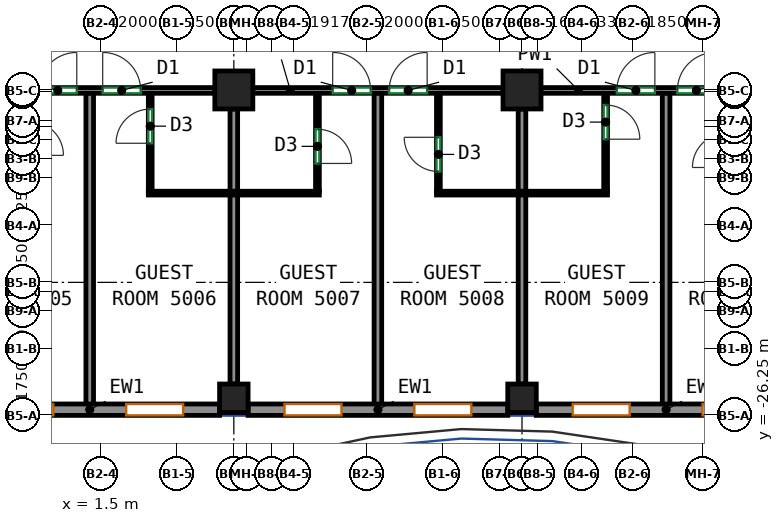
"""IFC4 building model, lengths in metres.
Left out: names, types, materials, properties, quantities, classifications, styles, units other than length and angle.
Written with IfcOpenShell. Run it as: python <this file> out.ifc"""

import sys

from ifc_helpers import new_model, si_unit, direction, frame, frame_2d, origin, origin_2d, place, context, subcontext, project, spatial, rectangle, extrude, source, transform, mapped, element, fill, save


model = new_model("IFC4")
c1 = context("Model", 3, precision=1e-05, world=origin(), true_north=direction((0.0, 1.0)))
c2 = subcontext(c1, "Body", "Model", "MODEL_VIEW")
j1 = project(units=[si_unit("LENGTHUNIT", "METRE"), si_unit("PLANEANGLEUNIT", "RADIAN")], contexts=[c1])
p1 = place(None, origin())
s1 = spatial("IfcSite", under=j1, at=p1, CompositionType="ELEMENT")
p2 = place(p1, origin())
s2 = spatial("IfcBuilding", under=s1, at=p2, CompositionType="ELEMENT")
p3 = place(p2, frame((0.0, 0.0, 206.7)))
s3 = spatial("IfcBuildingStorey", under=s2, at=p3, CompositionType="ELEMENT", Elevation=206.7)
m1 = source(origin(), c2, "Body", "SweptSolid", [
    extrude(rectangle(XDim=0.75, YDim=0.75, at=origin_2d()), origin(), (0.0, 0.0, 1.0), 3.12),
])
p4 = place(p3, frame((5.0, -25.8, 0.0), z_axis=(0.0, 0.0, 1.0), x_axis=(1.0, 0.0, 0.0)))
e1 = element("IfcColumn", 1, at=p4, inside=s3, PredefinedType="COLUMN", context=c2, shape_type="MappedRepresentation", body=[
    mapped(m1, transform((0.0, 0.0, 0.0))),
])
m2 = source(origin(), c2, "Body", "SweptSolid", [
    extrude(rectangle(XDim=1.0, YDim=1.0, at=origin_2d()), origin(), (0.0, 0.0, 1.0), 3.12),
])
p5 = place(p3, frame((5.0, -17.688, 0.0), z_axis=(0.0, 0.0, 1.0), x_axis=(1.0, 0.0, 0.0)))
e2 = element("IfcColumn", 2, at=p5, inside=s3, PredefinedType="COLUMN", context=c2, shape_type="MappedRepresentation", body=[
    mapped(m2, transform((0.0, 0.0, 0.0))),
])
p6 = place(p3, frame((12.583, -25.8, 0.0), z_axis=(0.0, 0.0, 1.0), x_axis=(1.0, 0.0, 0.0)))
e3 = element("IfcColumn", 3, at=p6, inside=s3, PredefinedType="COLUMN", context=c2, shape_type="MappedRepresentation", body=[
    mapped(m1, transform((0.0, 0.0, 0.0))),
])
p7 = place(p3, frame((12.583, -17.688, 0.0), z_axis=(0.0, 0.0, 1.0), x_axis=(1.0, 0.0, 0.0)))
e4 = element("IfcColumn", 4, at=p7, inside=s3, PredefinedType="COLUMN", context=c2, shape_type="MappedRepresentation", body=[
    mapped(m2, transform((0.0, 0.0, 0.0))),
])
m3 = source(origin(), c2, "Body", "SweptSolid", [
    extrude(rectangle(XDim=6.833, YDim=0.3, at=frame_2d((3.417, 0.0))), origin(), (0.0, 0.0, 1.0), 3.12),
])
p8 = place(p3, frame((-2.208, -26.1, 0.0), z_axis=(0.0, 0.0, 1.0), x_axis=(1.0, 0.0, 0.0)))
e5 = element("IfcWall", 5, at=p8, inside=s3, PredefinedType="SOLIDWALL", context=c2, shape_type="MappedRepresentation", body=[
    mapped(m3, transform((0.0, 0.0, 0.0))),
])
p9 = place(p8, frame((0.958, 0.0, 0.85)))
e6 = element("IfcOpeningElement", 6, at=p9, cuts=e5, PredefinedType="OPENING", context=c2, shape_type="SweptSolid", body=[
    extrude(rectangle(XDim=1.5, YDim=1.95, at=frame_2d((0.75, 0.975))), frame((0.0, 0.16, 0.0), z_axis=(0.0, -1.0, 0.0), x_axis=(1.0, 0.0, 0.0)), (0.0, 0.0, 1.0), 0.32),
])
p10 = place(p8, frame((4.375, 0.0, 0.85)))
e7 = element("IfcOpeningElement", 7, at=p10, cuts=e5, PredefinedType="OPENING", context=c2, shape_type="SweptSolid", body=[
    extrude(rectangle(XDim=1.5, YDim=1.95, at=frame_2d((0.75, 0.975))), frame((0.0, 0.16, 0.0), z_axis=(0.0, -1.0, 0.0), x_axis=(1.0, 0.0, 0.0)), (0.0, 0.0, 1.0), 0.32),
])
p11 = place(p3, frame((5.375, -26.1, 0.0), z_axis=(0.0, 0.0, 1.0), x_axis=(1.0, 0.0, 0.0)))
e8 = element("IfcWall", 8, at=p11, inside=s3, PredefinedType="SOLIDWALL", context=c2, shape_type="MappedRepresentation", body=[
    mapped(m3, transform((0.0, 0.0, 0.0))),
])
p12 = place(p11, frame((0.958, 0.0, 0.85)))
e9 = element("IfcOpeningElement", 9, at=p12, cuts=e8, PredefinedType="OPENING", context=c2, shape_type="SweptSolid", body=[
    extrude(rectangle(XDim=1.5, YDim=1.95, at=frame_2d((0.75, 0.975))), frame((0.0, 0.16, 0.0), z_axis=(0.0, -1.0, 0.0), x_axis=(1.0, 0.0, 0.0)), (0.0, 0.0, 1.0), 0.32),
])
p13 = place(p11, frame((4.375, 0.0, 0.85)))
e10 = element("IfcOpeningElement", 10, at=p13, cuts=e8, PredefinedType="OPENING", context=c2, shape_type="SweptSolid", body=[
    extrude(rectangle(XDim=1.5, YDim=1.95, at=frame_2d((0.75, 0.975))), frame((0.0, 0.16, 0.0), z_axis=(0.0, -1.0, 0.0), x_axis=(1.0, 0.0, 0.0)), (0.0, 0.0, 1.0), 0.32),
])
m4 = source(origin(), c2, "Body", "SweptSolid", [
    extrude(rectangle(XDim=6.833, YDim=0.3, at=frame_2d((3.417, 0.0))), origin(), (0.0, 0.0, 1.0), 3.12),
])
p14 = place(p3, frame((12.958, -26.1, 0.0), z_axis=(0.0, 0.0, 1.0), x_axis=(1.0, 0.0, 0.0)))
e11 = element("IfcWall", 11, at=p14, inside=s3, PredefinedType="SOLIDWALL", context=c2, shape_type="MappedRepresentation", body=[
    mapped(m4, transform((0.0, 0.0, 0.0))),
])
p15 = place(p14, frame((0.958, 0.0, 0.85)))
e12 = element("IfcOpeningElement", 12, at=p15, cuts=e11, PredefinedType="OPENING", context=c2, shape_type="SweptSolid", body=[
    extrude(rectangle(XDim=1.5, YDim=1.95, at=frame_2d((0.75, 0.975))), frame((0.0, 0.16, 0.0), z_axis=(0.0, -1.0, 0.0), x_axis=(1.0, 0.0, 0.0)), (0.0, 0.0, 1.0), 0.32),
])
p16 = place(p14, frame((4.375, 0.0, 0.85)))
e13 = element("IfcOpeningElement", 13, at=p16, cuts=e11, PredefinedType="OPENING", context=c2, shape_type="SweptSolid", body=[
    extrude(rectangle(XDim=1.5, YDim=1.95, at=frame_2d((0.75, 0.975))), frame((0.0, 0.16, 0.0), z_axis=(0.0, -1.0, 0.0), x_axis=(1.0, 0.0, 0.0)), (0.0, 0.0, 1.0), 0.32),
])
p17 = place(p3, frame((-2.083, -17.7, 0.0), z_axis=(0.0, 0.0, 1.0), x_axis=(1.0, 0.0, 0.0)))
e14 = element("IfcWall", 14, at=p17, inside=s3, PredefinedType="PARTITIONING", context=c2, shape_type="SweptSolid", body=[
    extrude(rectangle(XDim=6.583, YDim=0.15, at=frame_2d((3.292, 0.0))), origin(), (0.0, 0.0, 1.0), 3.12),
])
p18 = place(p17, frame((1.95, 0.0, 0.0)))
e15 = element("IfcOpeningElement", 15, at=p18, cuts=e14, PredefinedType="OPENING", context=c2, shape_type="SweptSolid", body=[
    extrude(rectangle(XDim=1.0, YDim=2.1, at=frame_2d((0.5, 1.05))), frame((0.0, 0.085, 0.0), z_axis=(0.0, -1.0, 0.0), x_axis=(1.0, 0.0, 0.0)), (0.0, 0.0, 1.0), 0.17),
])
p19 = place(p17, frame((3.632, 0.0, 0.0)))
e16 = element("IfcOpeningElement", 16, at=p19, cuts=e14, PredefinedType="OPENING", context=c2, shape_type="SweptSolid", body=[
    extrude(rectangle(XDim=1.0, YDim=2.1, at=frame_2d((0.5, 1.05))), frame((0.0, 0.085, 0.0), z_axis=(0.0, -1.0, 0.0), x_axis=(1.0, 0.0, 0.0)), (0.0, 0.0, 1.0), 0.17),
])
p20 = place(p3, frame((5.5, -17.7, 0.0), z_axis=(0.0, 0.0, 1.0), x_axis=(1.0, 0.0, 0.0)))
e17 = element("IfcWall", 17, at=p20, inside=s3, PredefinedType="PARTITIONING", context=c2, shape_type="SweptSolid", body=[
    extrude(rectangle(XDim=6.583, YDim=0.15, at=frame_2d((3.292, 0.0))), origin(), (0.0, 0.0, 1.0), 3.12),
])
p21 = place(p20, frame((2.101, 0.0, 0.0)))
e18 = element("IfcOpeningElement", 18, at=p21, cuts=e17, PredefinedType="OPENING", context=c2, shape_type="SweptSolid", body=[
    extrude(rectangle(XDim=1.0, YDim=2.1, at=frame_2d((0.5, 1.05))), frame((0.0, 0.085, 0.0), z_axis=(0.0, -1.0, 0.0), x_axis=(1.0, 0.0, 0.0)), (0.0, 0.0, 1.0), 0.17),
])
p22 = place(p20, frame((3.587, 0.0, 0.0)))
e19 = element("IfcOpeningElement", 19, at=p22, cuts=e17, PredefinedType="OPENING", context=c2, shape_type="SweptSolid", body=[
    extrude(rectangle(XDim=1.0, YDim=2.1, at=frame_2d((0.5, 1.05))), frame((0.0, 0.085, 0.0), z_axis=(0.0, -1.0, 0.0), x_axis=(1.0, 0.0, 0.0)), (0.0, 0.0, 1.0), 0.17),
])
p23 = place(p3, frame((13.083, -17.7, 0.0), z_axis=(0.0, 0.0, 1.0), x_axis=(1.0, 0.0, 0.0)))
e20 = element("IfcWall", 20, at=p23, inside=s3, PredefinedType="PARTITIONING", context=c2, shape_type="SweptSolid", body=[
    extrude(rectangle(XDim=6.584, YDim=0.15, at=frame_2d((3.292, 0.0))), origin(), (0.0, 0.0, 1.0), 3.12),
])
p24 = place(p23, frame((1.996, 0.0, 0.0)))
e21 = element("IfcOpeningElement", 21, at=p24, cuts=e20, PredefinedType="OPENING", context=c2, shape_type="SweptSolid", body=[
    extrude(rectangle(XDim=1.0, YDim=2.1, at=frame_2d((0.5, 1.05))), frame((0.0, 0.085, 0.0), z_axis=(0.0, -1.0, 0.0), x_axis=(1.0, 0.0, 0.0)), (0.0, 0.0, 1.0), 0.17),
])
p25 = place(p23, frame((3.588, 0.0, 0.0)))
e22 = element("IfcOpeningElement", 22, at=p25, cuts=e20, PredefinedType="OPENING", context=c2, shape_type="SweptSolid", body=[
    extrude(rectangle(XDim=1.0, YDim=2.1, at=frame_2d((0.5, 1.05))), frame((0.0, 0.085, 0.0), z_axis=(0.0, -1.0, 0.0), x_axis=(1.0, 0.0, 0.0)), (0.0, 0.0, 1.0), 0.17),
])
p26 = place(p3, frame((1.208, -26.0, 0.0), z_axis=(0.0, 0.0, 1.0), x_axis=(0.0, 1.0, 0.0)))
e23 = element("IfcWall", 23, at=p26, inside=s3, PredefinedType="PARTITIONING", context=c2, shape_type="SweptSolid", body=[
    extrude(rectangle(XDim=8.223, YDim=0.2, at=frame_2d((4.111, 0.0))), origin(), (0.0, 0.0, 1.0), 3.12),
])
p27 = place(p3, frame((2.8, -20.352, 0.0), z_axis=(0.0, 0.0, 1.0), x_axis=(0.0, 1.0, 0.0)))
e24 = element("IfcWall", 24, at=p27, inside=s3, PredefinedType="PARTITIONING", context=c2, shape_type="SweptSolid", body=[
    extrude(rectangle(XDim=2.575, YDim=0.1, at=frame_2d((1.288, 0.0))), origin(), (0.0, 0.0, 1.0), 3.12),
])
p28 = place(p27, frame((1.262, 0.0, 0.0)))
e25 = element("IfcOpeningElement", 25, at=p28, cuts=e24, PredefinedType="OPENING", context=c2, shape_type="SweptSolid", body=[
    extrude(rectangle(XDim=0.9, YDim=2.1, at=frame_2d((0.45, 1.05))), frame((0.0, 0.06, 0.0), z_axis=(0.0, -1.0, 0.0), x_axis=(1.0, 0.0, 0.0)), (0.0, 0.0, 1.0), 0.12),
])
p29 = place(p3, frame((2.75, -20.402, 0.0), z_axis=(0.0, 0.0, 1.0), x_axis=(1.0, 0.0, 0.0)))
e26 = element("IfcWall", 26, at=p29, inside=s3, PredefinedType="PARTITIONING", context=c2, shape_type="SweptSolid", body=[
    extrude(rectangle(XDim=4.5, YDim=0.1, at=frame_2d((2.25, 0.0))), origin(), (0.0, 0.0, 1.0), 3.12),
])
p30 = place(p3, frame((5.0, -25.425, 0.0), z_axis=(0.0, 0.0, 1.0), x_axis=(0.0, 1.0, 0.0)))
e27 = element("IfcWall", 27, at=p30, inside=s3, PredefinedType="PARTITIONING", context=c2, shape_type="SweptSolid", body=[
    extrude(rectangle(XDim=4.973, YDim=0.2, at=frame_2d((2.487, 0.0))), origin(), (0.0, 0.0, 1.0), 3.12),
])
p31 = place(p3, frame((5.0, -20.352, 0.0), z_axis=(0.0, 0.0, 1.0), x_axis=(0.0, 1.0, 0.0)))
e28 = element("IfcWall", 28, at=p31, inside=s3, PredefinedType="PARTITIONING", context=c2, shape_type="SweptSolid", body=[
    extrude(rectangle(XDim=2.164, YDim=0.2, at=frame_2d((1.082, 0.0))), origin(), (0.0, 0.0, 1.0), 3.12),
])
p32 = place(p3, frame((7.2, -17.777, 0.0), z_axis=(0.0, 0.0, 1.0), x_axis=(0.0, -1.0, 0.0)))
e29 = element("IfcWall", 29, at=p32, inside=s3, PredefinedType="PARTITIONING", context=c2, shape_type="SweptSolid", body=[
    extrude(rectangle(XDim=2.575, YDim=0.1, at=frame_2d((1.288, 0.0))), origin(), (0.0, 0.0, 1.0), 3.12),
])
p33 = place(p32, frame((0.944, 0.0, 0.0)))
e30 = element("IfcOpeningElement", 30, at=p33, cuts=e29, PredefinedType="OPENING", context=c2, shape_type="SweptSolid", body=[
    extrude(rectangle(XDim=0.9, YDim=2.1, at=frame_2d((0.45, 1.05))), frame((0.0, 0.06, 0.0), z_axis=(0.0, -1.0, 0.0), x_axis=(1.0, 0.0, 0.0)), (0.0, 0.0, 1.0), 0.12),
])
p34 = place(p3, frame((8.791, -26.0, 0.0), z_axis=(0.0, 0.0, 1.0), x_axis=(0.0, 1.0, 0.0)))
e31 = element("IfcWall", 31, at=p34, inside=s3, PredefinedType="PARTITIONING", context=c2, shape_type="SweptSolid", body=[
    extrude(rectangle(XDim=8.223, YDim=0.2, at=frame_2d((4.111, 0.0))), origin(), (0.0, 0.0, 1.0), 3.12),
])
p35 = place(p3, frame((10.383, -20.352, 0.0), z_axis=(0.0, 0.0, 1.0), x_axis=(0.0, 1.0, 0.0)))
e32 = element("IfcWall", 32, at=p35, inside=s3, PredefinedType="PARTITIONING", context=c2, shape_type="SweptSolid", body=[
    extrude(rectangle(XDim=2.575, YDim=0.1, at=frame_2d((1.288, 0.0))), origin(), (0.0, 0.0, 1.0), 3.12),
])
p36 = place(p35, frame((0.519, 0.0, 0.0)))
e33 = element("IfcOpeningElement", 33, at=p36, cuts=e32, PredefinedType="OPENING", context=c2, shape_type="SweptSolid", body=[
    extrude(rectangle(XDim=0.9, YDim=2.1, at=frame_2d((0.45, 1.05))), frame((0.0, 0.06, 0.0), z_axis=(0.0, -1.0, 0.0), x_axis=(1.0, 0.0, 0.0)), (0.0, 0.0, 1.0), 0.12),
])
p37 = place(p3, frame((10.333, -20.402, 0.0), z_axis=(0.0, 0.0, 1.0), x_axis=(1.0, 0.0, 0.0)))
e34 = element("IfcWall", 34, at=p37, inside=s3, PredefinedType="PARTITIONING", context=c2, shape_type="SweptSolid", body=[
    extrude(rectangle(XDim=4.5, YDim=0.1, at=frame_2d((2.25, 0.0))), origin(), (0.0, 0.0, 1.0), 3.12),
])
p38 = place(p3, frame((12.583, -25.425, 0.0), z_axis=(0.0, 0.0, 1.0), x_axis=(0.0, 1.0, 0.0)))
e35 = element("IfcWall", 35, at=p38, inside=s3, PredefinedType="PARTITIONING", context=c2, shape_type="SweptSolid", body=[
    extrude(rectangle(XDim=4.973, YDim=0.2, at=frame_2d((2.487, 0.0))), origin(), (0.0, 0.0, 1.0), 3.12),
])
p39 = place(p3, frame((12.583, -20.352, 0.0), z_axis=(0.0, 0.0, 1.0), x_axis=(0.0, 1.0, 0.0)))
e36 = element("IfcWall", 36, at=p39, inside=s3, PredefinedType="PARTITIONING", context=c2, shape_type="SweptSolid", body=[
    extrude(rectangle(XDim=2.164, YDim=0.2, at=frame_2d((1.082, 0.0))), origin(), (0.0, 0.0, 1.0), 3.12),
])
p40 = place(p3, frame((14.783, -17.777, 0.0), z_axis=(0.0, 0.0, 1.0), x_axis=(0.0, -1.0, 0.0)))
e37 = element("IfcWall", 37, at=p40, inside=s3, PredefinedType="PARTITIONING", context=c2, shape_type="SweptSolid", body=[
    extrude(rectangle(XDim=2.575, YDim=0.1, at=frame_2d((1.288, 0.0))), origin(), (0.0, 0.0, 1.0), 3.12),
])
p41 = place(p40, frame((0.306, 0.0, 0.0)))
e38 = element("IfcOpeningElement", 38, at=p41, cuts=e37, PredefinedType="OPENING", context=c2, shape_type="SweptSolid", body=[
    extrude(rectangle(XDim=0.9, YDim=2.1, at=frame_2d((0.45, 1.05))), frame((0.0, 0.06, 0.0), z_axis=(0.0, -1.0, 0.0), x_axis=(1.0, 0.0, 0.0)), (0.0, 0.0, 1.0), 0.12),
])
p42 = place(p3, frame((16.375, -26.0, 0.0), z_axis=(0.0, 0.0, 1.0), x_axis=(0.0, 1.0, 0.0)))
e39 = element("IfcWall", 39, at=p42, inside=s3, PredefinedType="PARTITIONING", context=c2, shape_type="SweptSolid", body=[
    extrude(rectangle(XDim=8.223, YDim=0.2, at=frame_2d((4.111, 0.0))), origin(), (0.0, 0.0, 1.0), 3.12),
])
p43 = place(p9, origin())
e40 = element("IfcWindow", 40, at=p43, inside=s3, PartitioningType="SINGLE_PANEL", PredefinedType="WINDOW", context=c2, shape_type="SweptSolid", body=[
    extrude(rectangle(XDim=1.5, YDim=1.95, at=frame_2d((0.75, 0.975))), frame((0.0, 0.03, 0.0), z_axis=(0.0, -1.0, 0.0), x_axis=(1.0, 0.0, 0.0)), (0.0, 0.0, 1.0), 0.06),
])
fill(e6, e40)
p44 = place(p10, origin())
e41 = element("IfcWindow", 41, at=p44, inside=s3, PartitioningType="SINGLE_PANEL", PredefinedType="WINDOW", context=c2, shape_type="SweptSolid", body=[
    extrude(rectangle(XDim=1.5, YDim=1.95, at=frame_2d((0.75, 0.975))), frame((0.0, 0.03, 0.0), z_axis=(0.0, -1.0, 0.0), x_axis=(1.0, 0.0, 0.0)), (0.0, 0.0, 1.0), 0.06),
])
fill(e7, e41)
p45 = place(p12, origin())
e42 = element("IfcWindow", 42, at=p45, inside=s3, PartitioningType="SINGLE_PANEL", PredefinedType="WINDOW", context=c2, shape_type="SweptSolid", body=[
    extrude(rectangle(XDim=1.5, YDim=1.95, at=frame_2d((0.75, 0.975))), frame((0.0, 0.03, 0.0), z_axis=(0.0, -1.0, 0.0), x_axis=(1.0, 0.0, 0.0)), (0.0, 0.0, 1.0), 0.06),
])
fill(e9, e42)
p46 = place(p13, origin())
e43 = element("IfcWindow", 43, at=p46, inside=s3, PartitioningType="SINGLE_PANEL", PredefinedType="WINDOW", context=c2, shape_type="SweptSolid", body=[
    extrude(rectangle(XDim=1.5, YDim=1.95, at=frame_2d((0.75, 0.975))), frame((0.0, 0.03, 0.0), z_axis=(0.0, -1.0, 0.0), x_axis=(1.0, 0.0, 0.0)), (0.0, 0.0, 1.0), 0.06),
])
fill(e10, e43)
p47 = place(p15, origin())
e44 = element("IfcWindow", 44, at=p47, inside=s3, PartitioningType="SINGLE_PANEL", PredefinedType="WINDOW", context=c2, shape_type="SweptSolid", body=[
    extrude(rectangle(XDim=1.5, YDim=1.95, at=frame_2d((0.75, 0.975))), frame((0.0, 0.03, 0.0), z_axis=(0.0, -1.0, 0.0), x_axis=(1.0, 0.0, 0.0)), (0.0, 0.0, 1.0), 0.06),
])
fill(e12, e44)
p48 = place(p16, origin())
e45 = element("IfcWindow", 45, at=p48, inside=s3, PartitioningType="SINGLE_PANEL", PredefinedType="WINDOW", context=c2, shape_type="SweptSolid", body=[
    extrude(rectangle(XDim=1.5, YDim=1.95, at=frame_2d((0.75, 0.975))), frame((0.0, 0.03, 0.0), z_axis=(0.0, -1.0, 0.0), x_axis=(1.0, 0.0, 0.0)), (0.0, 0.0, 1.0), 0.06),
])
fill(e13, e45)
p49 = place(p36, origin())
e46 = element("IfcDoor", 46, at=p49, inside=s3, OperationType="SINGLE_SWING_RIGHT", PredefinedType="DOOR", context=c2, shape_type="SweptSolid", body=[
    extrude(rectangle(XDim=0.9, YDim=2.1, at=frame_2d((0.45, 1.05))), frame((0.0, 0.025, 0.0), z_axis=(0.0, -1.0, 0.0), x_axis=(1.0, 0.0, 0.0)), (0.0, 0.0, 1.0), 0.05),
])
fill(e33, e46)
p50 = place(p33, origin())
e47 = element("IfcDoor", 47, at=p50, inside=s3, OperationType="SINGLE_SWING_RIGHT", PredefinedType="DOOR", context=c2, shape_type="SweptSolid", body=[
    extrude(rectangle(XDim=0.9, YDim=2.1, at=frame_2d((0.45, 1.05))), frame((0.0, 0.025, 0.0), z_axis=(0.0, -1.0, 0.0), x_axis=(1.0, 0.0, 0.0)), (0.0, 0.0, 1.0), 0.05),
])
fill(e30, e47)
p51 = place(p28, origin())
e48 = element("IfcDoor", 48, at=p51, inside=s3, OperationType="SINGLE_SWING_LEFT", PredefinedType="DOOR", context=c2, shape_type="SweptSolid", body=[
    extrude(rectangle(XDim=0.9, YDim=2.1, at=frame_2d((0.45, 1.05))), frame((0.0, 0.025, 0.0), z_axis=(0.0, -1.0, 0.0), x_axis=(1.0, 0.0, 0.0)), (0.0, 0.0, 1.0), 0.05),
])
fill(e25, e48)
p52 = place(p41, origin())
e49 = element("IfcDoor", 49, at=p52, inside=s3, OperationType="SINGLE_SWING_RIGHT", PredefinedType="DOOR", context=c2, shape_type="SweptSolid", body=[
    extrude(rectangle(XDim=0.9, YDim=2.1, at=frame_2d((0.45, 1.05))), frame((0.0, 0.025, 0.0), z_axis=(0.0, -1.0, 0.0), x_axis=(1.0, 0.0, 0.0)), (0.0, 0.0, 1.0), 0.05),
])
fill(e38, e49)
p53 = place(p18, origin())
e50 = element("IfcDoor", 50, at=p53, inside=s3, OperationType="SINGLE_SWING_RIGHT", PredefinedType="DOOR", context=c2, shape_type="SweptSolid", body=[
    extrude(rectangle(XDim=1.0, YDim=2.1, at=frame_2d((0.5, 1.05))), frame((0.0, 0.025, 0.0), z_axis=(0.0, -1.0, 0.0), x_axis=(1.0, 0.0, 0.0)), (0.0, 0.0, 1.0), 0.05),
])
fill(e15, e50)
p54 = place(p19, origin())
e51 = element("IfcDoor", 51, at=p54, inside=s3, OperationType="SINGLE_SWING_LEFT", PredefinedType="DOOR", context=c2, shape_type="SweptSolid", body=[
    extrude(rectangle(XDim=1.0, YDim=2.1, at=frame_2d((0.5, 1.05))), frame((0.0, 0.025, 0.0), z_axis=(0.0, -1.0, 0.0), x_axis=(1.0, 0.0, 0.0)), (0.0, 0.0, 1.0), 0.05),
])
fill(e16, e51)
p55 = place(p21, origin())
e52 = element("IfcDoor", 52, at=p55, inside=s3, OperationType="SINGLE_SWING_LEFT", PredefinedType="DOOR", context=c2, shape_type="SweptSolid", body=[
    extrude(rectangle(XDim=1.0, YDim=2.1, at=frame_2d((0.5, 1.05))), frame((0.0, 0.025, 0.0), z_axis=(0.0, -1.0, 0.0), x_axis=(1.0, 0.0, 0.0)), (0.0, 0.0, 1.0), 0.05),
])
fill(e18, e52)
p56 = place(p22, origin())
e53 = element("IfcDoor", 53, at=p56, inside=s3, OperationType="SINGLE_SWING_RIGHT", PredefinedType="DOOR", context=c2, shape_type="SweptSolid", body=[
    extrude(rectangle(XDim=1.0, YDim=2.1, at=frame_2d((0.5, 1.05))), frame((0.0, 0.025, 0.0), z_axis=(0.0, -1.0, 0.0), x_axis=(1.0, 0.0, 0.0)), (0.0, 0.0, 1.0), 0.05),
])
fill(e19, e53)
p57 = place(p24, origin())
e54 = element("IfcDoor", 54, at=p57, inside=s3, OperationType="SINGLE_SWING_RIGHT", PredefinedType="DOOR", context=c2, shape_type="SweptSolid", body=[
    extrude(rectangle(XDim=1.0, YDim=2.1, at=frame_2d((0.5, 1.05))), frame((0.0, 0.025, 0.0), z_axis=(0.0, -1.0, 0.0), x_axis=(1.0, 0.0, 0.0)), (0.0, 0.0, 1.0), 0.05),
])
fill(e21, e54)
p58 = place(p25, origin())
e55 = element("IfcDoor", 55, at=p58, inside=s3, OperationType="SINGLE_SWING_RIGHT", PredefinedType="DOOR", context=c2, shape_type="SweptSolid", body=[
    extrude(rectangle(XDim=1.0, YDim=2.1, at=frame_2d((0.5, 1.05))), frame((0.0, 0.025, 0.0), z_axis=(0.0, -1.0, 0.0), x_axis=(1.0, 0.0, 0.0)), (0.0, 0.0, 1.0), 0.05),
])
fill(e22, e55)
save(model, sys.argv[1])
